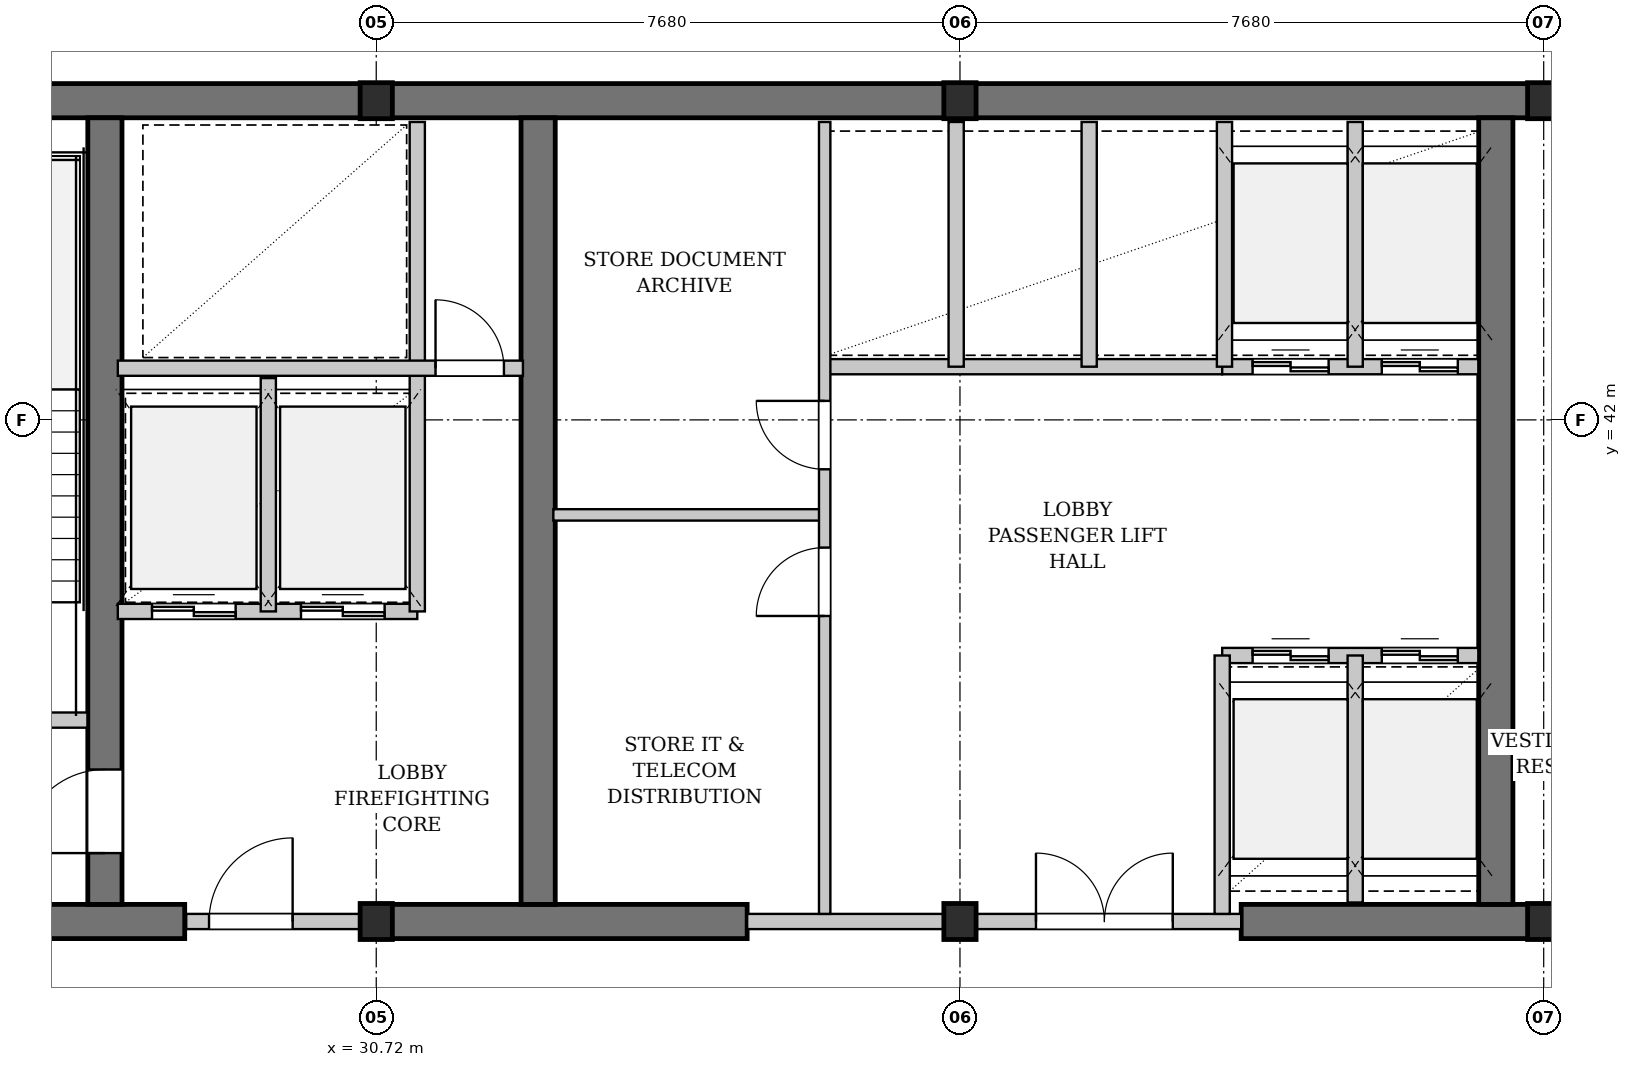
"""IFC4 building model, lengths in metres.
Left out: names, types, materials, properties, quantities, classifications, styles, units other than length and angle.
Written with IfcOpenShell. Run it as: python <this file> out.ifc"""

import sys

from ifc_helpers import new_model, si_unit, direction, frame, frame_2d, origin, origin_2d, place, context, subcontext, project, spatial, rectangle, i_section, extrude, element, fill, save


model = new_model("IFC4")
c1 = context("Model", 3, precision=1e-05, world=origin(), true_north=direction((0.0, 1.0)))
c2 = subcontext(c1, "Body", "Model", "MODEL_VIEW")
j1 = project(units=[si_unit("LENGTHUNIT", "METRE"), si_unit("PLANEANGLEUNIT", "RADIAN")], contexts=[c1])
p1 = place(None, origin())
s1 = spatial("IfcSite", under=j1, at=p1, CompositionType="ELEMENT")
p2 = place(p1, origin())
s2 = spatial("IfcBuilding", under=s1, at=p2, CompositionType="ELEMENT")
p3 = place(p2, frame((0.0, 0.0, 141.2)))
s3 = spatial("IfcBuildingStorey", under=s2, at=p3, CompositionType="ELEMENT", Elevation=141.2)
p4 = place(p3, frame((22.815, 46.2, 0.0), z_axis=(0.0, 0.0, 1.0), x_axis=(1.0, 0.0, 0.0)))
e1 = element("IfcWall", 1, at=p4, inside=s3, PredefinedType="SHEAR", context=c2, shape_type="SweptSolid", body=[
    extrude(rectangle(XDim=31.17, YDim=0.45, at=frame_2d((15.585, 0.0))), origin(), (0.0, 0.0, 1.0), 3.48),
])
p5 = place(p3, frame((22.815, 35.4, 0.0), z_axis=(0.0, 0.0, 1.0), x_axis=(1.0, 0.0, 0.0)))
e2 = element("IfcWall", 2, at=p5, inside=s3, PredefinedType="SHEAR", context=c2, shape_type="SweptSolid", body=[
    extrude(rectangle(XDim=5.385, YDim=0.45, at=frame_2d((2.692, 0.0))), origin(), (0.0, 0.0, 1.0), 3.48),
])
p6 = place(p3, frame((30.72, 35.4, 0.0), z_axis=(0.0, 0.0, 1.0), x_axis=(1.0, 0.0, 0.0)))
e3 = element("IfcWall", 3, at=p6, inside=s3, PredefinedType="SHEAR", context=c2, shape_type="SweptSolid", body=[
    extrude(rectangle(XDim=4.88, YDim=0.45, at=frame_2d((2.44, 0.0))), origin(), (0.0, 0.0, 1.0), 3.48),
])
p7 = place(p3, frame((42.1, 35.4, 0.0), z_axis=(0.0, 0.0, 1.0), x_axis=(1.0, 0.0, 0.0)))
e4 = element("IfcWall", 4, at=p7, inside=s3, PredefinedType="SHEAR", context=c2, shape_type="SweptSolid", body=[
    extrude(rectangle(XDim=8.05, YDim=0.45, at=frame_2d((4.025, 0.0))), origin(), (0.0, 0.0, 1.0), 3.48),
])
p8 = place(p7, frame((4.85, 0.0, 0.0)))
e5 = element("IfcOpeningElement", 5, at=p8, cuts=e4, PredefinedType="OPENING", context=c2, shape_type="SweptSolid", body=[
    extrude(rectangle(XDim=0.9, YDim=2.15, at=frame_2d((0.45, 1.075))), frame((0.0, 0.235, 0.0), z_axis=(0.0, -1.0, 0.0), x_axis=(1.0, 0.0, 0.0)), (0.0, 0.0, 1.0), 0.47),
])
p9 = place(p3, frame((27.15, 35.625, 0.0), z_axis=(0.0, 0.0, 1.0), x_axis=(0.0, 1.0, 0.0)))
e6 = element("IfcWall", 6, at=p9, inside=s3, PredefinedType="SHEAR", context=c2, shape_type="SweptSolid", body=[
    extrude(rectangle(XDim=10.35, YDim=0.45, at=frame_2d((5.175, 0.0))), origin(), (0.0, 0.0, 1.0), 3.48),
])
p10 = place(p9, frame((0.675, 0.0, 0.0)))
e7 = element("IfcOpeningElement", 7, at=p10, cuts=e6, PredefinedType="OPENING", context=c2, shape_type="SweptSolid", body=[
    extrude(rectangle(XDim=1.1, YDim=2.15, at=frame_2d((0.55, 1.075))), frame((0.0, 0.235, 0.0), z_axis=(0.0, -1.0, 0.0), x_axis=(1.0, 0.0, 0.0)), (0.0, 0.0, 1.0), 0.47),
])
for number, where, z_axis, x_axis in (
    (8, (32.85, 35.625, 0.0), (0.0, 0.0, 1.0), (0.0, 1.0, 0.0)),
    (9, (45.45, 35.625, 0.0), (0.0, 0.0, 1.0), (0.0, 1.0, 0.0)),
):
    element("IfcWall", number, at=place(p3, frame(where, z_axis=z_axis, x_axis=x_axis)), inside=s3, PredefinedType="SHEAR", context=c2, shape_type="SweptSolid", body=[
        extrude(rectangle(XDim=10.35, YDim=0.45, at=frame_2d((5.175, 0.0))), origin(), (0.0, 0.0, 1.0), 3.48),
    ])
for number, where, z_axis, x_axis in (
    (10, (30.72, 35.4, 0.0), (0.0, 0.0, 1.0), (1.0, 0.0, 0.0)),
    (11, (30.72, 46.2, 0.0), (0.0, 0.0, 1.0), (1.0, 0.0, 0.0)),
    (12, (38.4, 35.4, 0.0), (0.0, 0.0, 1.0), (1.0, 0.0, 0.0)),
    (13, (38.4, 46.2, 0.0), (0.0, 0.0, 1.0), (1.0, 0.0, 0.0)),
    (14, (46.08, 35.4, 0.0), (0.0, 0.0, 1.0), (1.0, 0.0, 0.0)),
    (15, (46.08, 46.2, 0.0), (0.0, 0.0, 1.0), (1.0, 0.0, 0.0)),
):
    element("IfcColumn", number, at=place(p3, frame(where, z_axis=z_axis, x_axis=x_axis)), inside=s3, PredefinedType="COLUMN", context=c2, shape_type="SweptSolid", body=[
        extrude(i_section(OverallWidth=0.424, OverallDepth=0.474, WebThickness=0.047, FlangeThickness=0.077, FilletRadius=0.015, at=origin_2d()), origin(), (0.0, 0.0, 1.0), 3.9),
    ])
p11 = place(p3, frame((23.3, 38.05, 0.0), z_axis=(0.0, 0.0, 1.0), x_axis=(1.0, 0.0, 0.0)))
e16 = element("IfcWall", 16, at=p11, inside=s3, PredefinedType="PARTITIONING", context=c2, shape_type="SweptSolid", body=[
    extrude(rectangle(XDim=3.62, YDim=0.2, at=frame_2d((1.81, 0.0))), origin(), (0.0, 0.0, 1.0), 3.48),
])
p12 = place(p11, frame((1.26, 0.0, 0.0)))
e17 = element("IfcOpeningElement", 17, at=p12, cuts=e16, PredefinedType="OPENING", context=c2, shape_type="SweptSolid", body=[
    extrude(rectangle(XDim=1.1, YDim=2.15, at=frame_2d((0.55, 1.075))), frame((0.0, 0.11, 0.0), z_axis=(0.0, -1.0, 0.0), x_axis=(1.0, 0.0, 0.0)), (0.0, 0.0, 1.0), 0.22),
])
p13 = place(p3, frame((28.22, 35.4, 0.0), z_axis=(0.0, 0.0, 1.0), x_axis=(1.0, 0.0, 0.0)))
e18 = element("IfcWall", 18, at=p13, inside=s3, PredefinedType="PARTITIONING", context=c2, shape_type="SweptSolid", body=[
    extrude(rectangle(XDim=2.5, YDim=0.2, at=frame_2d((1.25, 0.0))), origin(), (0.0, 0.0, 1.0), 2.565),
])
p14 = place(p13, frame((0.3, 0.0, 0.0)))
e19 = element("IfcOpeningElement", 19, at=p14, cuts=e18, PredefinedType="OPENING", context=c2, shape_type="SweptSolid", body=[
    extrude(rectangle(XDim=1.1, YDim=2.15, at=frame_2d((0.55, 1.075))), frame((0.0, 0.11, 0.0), z_axis=(0.0, -1.0, 0.0), x_axis=(1.0, 0.0, 0.0)), (0.0, 0.0, 1.0), 0.22),
])
p15 = place(p3, frame((27.32, 39.48, 0.0), z_axis=(0.0, 0.0, 1.0), x_axis=(1.0, 0.0, 0.0)))
e20 = element("IfcWall", 20, at=p15, inside=s3, PredefinedType="PARTITIONING", context=c2, shape_type="SweptSolid", body=[
    extrude(rectangle(XDim=3.94, YDim=0.2, at=frame_2d((1.97, 0.0))), origin(), (0.0, 0.0, 1.0), 3.48),
])
p16 = place(p15, frame((0.45, 0.0, 0.0)))
e21 = element("IfcOpeningElement", 21, at=p16, cuts=e20, PredefinedType="OPENING", context=c2, shape_type="SweptSolid", body=[
    extrude(rectangle(XDim=1.1, YDim=2.2, at=frame_2d((0.55, 1.1))), frame((0.0, 0.11, 0.0), z_axis=(0.0, -1.0, 0.0), x_axis=(1.0, 0.0, 0.0)), (0.0, 0.0, 1.0), 0.22),
])
p17 = place(p15, frame((2.41, 0.0, 0.0)))
e22 = element("IfcOpeningElement", 22, at=p17, cuts=e20, PredefinedType="OPENING", context=c2, shape_type="SweptSolid", body=[
    extrude(rectangle(XDim=1.1, YDim=2.2, at=frame_2d((0.55, 1.1))), frame((0.0, 0.11, 0.0), z_axis=(0.0, -1.0, 0.0), x_axis=(1.0, 0.0, 0.0)), (0.0, 0.0, 1.0), 0.22),
])
p18 = place(p3, frame((29.3, 39.48, 0.0), z_axis=(0.0, 0.0, 1.0), x_axis=(0.0, 1.0, 0.0)))
e23 = element("IfcWall", 23, at=p18, inside=s3, PredefinedType="PARTITIONING", context=c2, shape_type="SweptSolid", body=[
    extrude(rectangle(XDim=3.07, YDim=0.2, at=frame_2d((1.535, 0.0))), origin(), (0.0, 0.0, 1.0), 3.48),
])
p19 = place(p3, frame((31.26, 39.48, 0.0), z_axis=(0.0, 0.0, 1.0), x_axis=(0.0, 1.0, 0.0)))
e24 = element("IfcWall", 24, at=p19, inside=s3, PredefinedType="PARTITIONING", context=c2, shape_type="SweptSolid", body=[
    extrude(rectangle(XDim=6.44, YDim=0.2, at=frame_2d((3.22, 0.0))), origin(), (0.0, 0.0, 1.0), 3.48),
])
p20 = place(p3, frame((27.32, 42.68, 0.0), z_axis=(0.0, 0.0, 1.0), x_axis=(1.0, 0.0, 0.0)))
e25 = element("IfcWall", 25, at=p20, inside=s3, PredefinedType="PARTITIONING", context=c2, shape_type="SweptSolid", body=[
    extrude(rectangle(XDim=5.33, YDim=0.2, at=frame_2d((2.665, 0.0))), origin(), (0.0, 0.0, 1.0), 3.48),
])
p21 = place(p20, frame((4.18, 0.0, 0.0)))
e26 = element("IfcOpeningElement", 26, at=p21, cuts=e25, PredefinedType="OPENING", context=c2, shape_type="SweptSolid", body=[
    extrude(rectangle(XDim=0.9, YDim=2.15, at=frame_2d((0.45, 1.075))), frame((0.0, 0.11, 0.0), z_axis=(0.0, -1.0, 0.0), x_axis=(1.0, 0.0, 0.0)), (0.0, 0.0, 1.0), 0.22),
])
p22 = place(p3, frame((35.6, 35.4, 0.0), z_axis=(0.0, 0.0, 1.0), x_axis=(1.0, 0.0, 0.0)))
e27 = element("IfcWall", 27, at=p22, inside=s3, PredefinedType="PARTITIONING", context=c2, shape_type="SweptSolid", body=[
    extrude(rectangle(XDim=6.5, YDim=0.2, at=frame_2d((3.25, 0.0))), origin(), (0.0, 0.0, 1.0), 2.565),
])
p23 = place(p22, frame((3.8, 0.0, 0.0)))
e28 = element("IfcOpeningElement", 28, at=p23, cuts=e27, PredefinedType="OPENING", context=c2, shape_type="SweptSolid", body=[
    extrude(rectangle(XDim=1.8, YDim=2.3, at=frame_2d((0.9, 1.15))), frame((0.0, 0.11, 0.0), z_axis=(0.0, -1.0, 0.0), x_axis=(1.0, 0.0, 0.0)), (0.0, 0.0, 1.0), 0.22),
])
p24 = place(p3, frame((36.6, 42.7, 0.0), z_axis=(0.0, 0.0, 1.0), x_axis=(1.0, 0.0, 0.0)))
e29 = element("IfcWall", 29, at=p24, inside=s3, PredefinedType="PARTITIONING", context=c2, shape_type="SweptSolid", body=[
    extrude(rectangle(XDim=5.25, YDim=0.2, at=frame_2d((2.625, 0.0))), origin(), (0.0, 0.0, 1.0), 3.48),
])
p25 = place(p3, frame((38.35, 42.7, 0.0), z_axis=(0.0, 0.0, 1.0), x_axis=(0.0, 1.0, 0.0)))
e30 = element("IfcWall", 30, at=p25, inside=s3, PredefinedType="PARTITIONING", context=c2, shape_type="SweptSolid", body=[
    extrude(rectangle(XDim=3.22, YDim=0.2, at=frame_2d((1.61, 0.0))), origin(), (0.0, 0.0, 1.0), 2.565),
])
p26 = place(p3, frame((40.1, 42.7, 0.0), z_axis=(0.0, 0.0, 1.0), x_axis=(0.0, 1.0, 0.0)))
e31 = element("IfcWall", 31, at=p26, inside=s3, PredefinedType="PARTITIONING", context=c2, shape_type="SweptSolid", body=[
    extrude(rectangle(XDim=3.22, YDim=0.2, at=frame_2d((1.61, 0.0))), origin(), (0.0, 0.0, 1.0), 3.48),
])
p27 = place(p3, frame((33.05, 40.75, 0.0), z_axis=(0.0, 0.0, 1.0), x_axis=(1.0, 0.0, 0.0)))
e32 = element("IfcWall", 32, at=p27, inside=s3, PredefinedType="PARTITIONING", context=c2, shape_type="SweptSolid", body=[
    extrude(rectangle(XDim=3.57, YDim=0.15, at=frame_2d((1.785, 0.0))), origin(), (0.0, 0.0, 1.0), 3.48),
])
p28 = place(p3, frame((36.62, 35.5, 0.0), z_axis=(0.0, 0.0, 1.0), x_axis=(0.0, 1.0, 0.0)))
e33 = element("IfcWall", 33, at=p28, inside=s3, PredefinedType="PARTITIONING", context=c2, shape_type="SweptSolid", body=[
    extrude(rectangle(XDim=10.42, YDim=0.15, at=frame_2d((5.21, 0.0))), origin(), (0.0, 0.0, 1.0), 3.48),
])
p29 = place(p28, frame((3.92, 0.0, 0.0)))
e34 = element("IfcOpeningElement", 34, at=p29, cuts=e33, PredefinedType="OPENING", context=c2, shape_type="SweptSolid", body=[
    extrude(rectangle(XDim=0.9, YDim=2.15, at=frame_2d((0.45, 1.075))), frame((0.0, 0.085, 0.0), z_axis=(0.0, -1.0, 0.0), x_axis=(1.0, 0.0, 0.0)), (0.0, 0.0, 1.0), 0.17),
])
p30 = place(p28, frame((5.85, 0.0, 0.0)))
e35 = element("IfcOpeningElement", 35, at=p30, cuts=e33, PredefinedType="OPENING", context=c2, shape_type="SweptSolid", body=[
    extrude(rectangle(XDim=0.9, YDim=2.15, at=frame_2d((0.45, 1.075))), frame((0.0, 0.085, 0.0), z_axis=(0.0, -1.0, 0.0), x_axis=(1.0, 0.0, 0.0)), (0.0, 0.0, 1.0), 0.17),
])
p31 = place(p3, frame((41.85, 38.9, 0.0), z_axis=(0.0, 0.0, 1.0), x_axis=(1.0, 0.0, 0.0)))
e36 = element("IfcWall", 36, at=p31, inside=s3, PredefinedType="PARTITIONING", context=c2, shape_type="SweptSolid", body=[
    extrude(rectangle(XDim=3.37, YDim=0.2, at=frame_2d((1.685, 0.0))), origin(), (0.0, 0.0, 1.0), 3.48),
])
p32 = place(p31, frame((0.4, 0.0, 0.0)))
e37 = element("IfcOpeningElement", 37, at=p32, cuts=e36, PredefinedType="OPENING", context=c2, shape_type="SweptSolid", body=[
    extrude(rectangle(XDim=1.0, YDim=2.2, at=frame_2d((0.5, 1.1))), frame((0.0, 0.11, 0.0), z_axis=(0.0, -1.0, 0.0), x_axis=(1.0, 0.0, 0.0)), (0.0, 0.0, 1.0), 0.22),
])
p33 = place(p31, frame((2.1, 0.0, 0.0)))
e38 = element("IfcOpeningElement", 38, at=p33, cuts=e36, PredefinedType="OPENING", context=c2, shape_type="SweptSolid", body=[
    extrude(rectangle(XDim=1.0, YDim=2.2, at=frame_2d((0.5, 1.1))), frame((0.0, 0.11, 0.0), z_axis=(0.0, -1.0, 0.0), x_axis=(1.0, 0.0, 0.0)), (0.0, 0.0, 1.0), 0.22),
])
p34 = place(p3, frame((41.85, 42.7, 0.0), z_axis=(0.0, 0.0, 1.0), x_axis=(1.0, 0.0, 0.0)))
e39 = element("IfcWall", 39, at=p34, inside=s3, PredefinedType="PARTITIONING", context=c2, shape_type="SweptSolid", body=[
    extrude(rectangle(XDim=3.37, YDim=0.2, at=frame_2d((1.685, 0.0))), origin(), (0.0, 0.0, 1.0), 3.48),
])
p35 = place(p34, frame((0.4, 0.0, 0.0)))
e40 = element("IfcOpeningElement", 40, at=p35, cuts=e39, PredefinedType="OPENING", context=c2, shape_type="SweptSolid", body=[
    extrude(rectangle(XDim=1.0, YDim=2.2, at=frame_2d((0.5, 1.1))), frame((0.0, 0.11, 0.0), z_axis=(0.0, -1.0, 0.0), x_axis=(1.0, 0.0, 0.0)), (0.0, 0.0, 1.0), 0.22),
])
p36 = place(p34, frame((2.1, 0.0, 0.0)))
e41 = element("IfcOpeningElement", 41, at=p36, cuts=e39, PredefinedType="OPENING", context=c2, shape_type="SweptSolid", body=[
    extrude(rectangle(XDim=1.0, YDim=2.2, at=frame_2d((0.5, 1.1))), frame((0.0, 0.11, 0.0), z_axis=(0.0, -1.0, 0.0), x_axis=(1.0, 0.0, 0.0)), (0.0, 0.0, 1.0), 0.22),
])
p37 = place(p3, frame((43.6, 35.65, 0.0), z_axis=(0.0, 0.0, 1.0), x_axis=(0.0, 1.0, 0.0)))
e42 = element("IfcWall", 42, at=p37, inside=s3, PredefinedType="PARTITIONING", context=c2, shape_type="SweptSolid", body=[
    extrude(rectangle(XDim=3.25, YDim=0.2, at=frame_2d((1.625, 0.0))), origin(), (0.0, 0.0, 1.0), 3.48),
])
p38 = place(p3, frame((43.6, 42.7, 0.0), z_axis=(0.0, 0.0, 1.0), x_axis=(0.0, 1.0, 0.0)))
e43 = element("IfcWall", 43, at=p38, inside=s3, PredefinedType="PARTITIONING", context=c2, shape_type="SweptSolid", body=[
    extrude(rectangle(XDim=3.22, YDim=0.2, at=frame_2d((1.61, 0.0))), origin(), (0.0, 0.0, 1.0), 3.48),
])
p39 = place(p3, frame((41.85, 35.5, 0.0), z_axis=(0.0, 0.0, 1.0), x_axis=(0.0, 1.0, 0.0)))
e44 = element("IfcWall", 44, at=p39, inside=s3, PredefinedType="PARTITIONING", context=c2, shape_type="SweptSolid", body=[
    extrude(rectangle(XDim=3.4, YDim=0.2, at=frame_2d((1.7, 0.0))), origin(), (0.0, 0.0, 1.0), 3.48),
])
p40 = place(p3, frame((41.88, 42.7, 0.0), z_axis=(0.0, 0.0, 1.0), x_axis=(0.0, 1.0, 0.0)))
e45 = element("IfcWall", 45, at=p40, inside=s3, PredefinedType="PARTITIONING", context=c2, shape_type="SweptSolid", body=[
    extrude(rectangle(XDim=3.22, YDim=0.2, at=frame_2d((1.61, 0.0))), origin(), (0.0, 0.0, 1.0), 3.48),
])
p41 = place(p14, origin())
e46 = element("IfcDoor", 46, at=p41, inside=s3, OperationType="SINGLE_SWING_RIGHT", PredefinedType="DOOR", context=c2, shape_type="SweptSolid", body=[
    extrude(rectangle(XDim=1.1, YDim=2.15, at=frame_2d((0.55, 1.075))), frame((0.0, 0.025, 0.0), z_axis=(0.0, -1.0, 0.0), x_axis=(1.0, 0.0, 0.0)), (0.0, 0.0, 1.0), 0.05),
])
fill(e19, e46)
p42 = place(p16, origin())
e47 = element("IfcDoor", 47, at=p42, inside=s3, OperationType="DOUBLE_DOOR_SLIDING", PredefinedType="DOOR", context=c2, shape_type="SweptSolid", body=[
    extrude(rectangle(XDim=1.1, YDim=2.2, at=frame_2d((0.55, 1.1))), frame((0.0, 0.025, 0.0), z_axis=(0.0, -1.0, 0.0), x_axis=(1.0, 0.0, 0.0)), (0.0, 0.0, 1.0), 0.05),
])
fill(e21, e47)
p43 = place(p17, origin())
e48 = element("IfcDoor", 48, at=p43, inside=s3, OperationType="DOUBLE_DOOR_SLIDING", PredefinedType="DOOR", context=c2, shape_type="SweptSolid", body=[
    extrude(rectangle(XDim=1.1, YDim=2.2, at=frame_2d((0.55, 1.1))), frame((0.0, 0.025, 0.0), z_axis=(0.0, -1.0, 0.0), x_axis=(1.0, 0.0, 0.0)), (0.0, 0.0, 1.0), 0.05),
])
fill(e22, e48)
p44 = place(p21, origin())
e49 = element("IfcDoor", 49, at=p44, inside=s3, OperationType="SINGLE_SWING_LEFT", PredefinedType="DOOR", context=c2, shape_type="SweptSolid", body=[
    extrude(rectangle(XDim=0.9, YDim=2.15, at=frame_2d((0.45, 1.075))), frame((0.0, 0.025, 0.0), z_axis=(0.0, -1.0, 0.0), x_axis=(1.0, 0.0, 0.0)), (0.0, 0.0, 1.0), 0.05),
])
fill(e26, e49)
p45 = place(p23, origin())
e50 = element("IfcDoor", 50, at=p45, inside=s3, OperationType="DOUBLE_DOOR_SINGLE_SWING", PredefinedType="DOOR", context=c2, shape_type="SweptSolid", body=[
    extrude(rectangle(XDim=1.8, YDim=2.3, at=frame_2d((0.9, 1.15))), frame((0.0, 0.025, 0.0), z_axis=(0.0, -1.0, 0.0), x_axis=(1.0, 0.0, 0.0)), (0.0, 0.0, 1.0), 0.05),
])
fill(e28, e50)
p46 = place(p29, origin())
e51 = element("IfcDoor", 51, at=p46, inside=s3, OperationType="SINGLE_SWING_LEFT", PredefinedType="DOOR", context=c2, shape_type="SweptSolid", body=[
    extrude(rectangle(XDim=0.9, YDim=2.15, at=frame_2d((0.45, 1.075))), frame((0.0, 0.025, 0.0), z_axis=(0.0, -1.0, 0.0), x_axis=(1.0, 0.0, 0.0)), (0.0, 0.0, 1.0), 0.05),
])
fill(e34, e51)
p47 = place(p30, origin())
e52 = element("IfcDoor", 52, at=p47, inside=s3, OperationType="SINGLE_SWING_RIGHT", PredefinedType="DOOR", context=c2, shape_type="SweptSolid", body=[
    extrude(rectangle(XDim=0.9, YDim=2.15, at=frame_2d((0.45, 1.075))), frame((0.0, 0.025, 0.0), z_axis=(0.0, -1.0, 0.0), x_axis=(1.0, 0.0, 0.0)), (0.0, 0.0, 1.0), 0.05),
])
fill(e35, e52)
p48 = place(p32, origin())
e53 = element("IfcDoor", 53, at=p48, inside=s3, OperationType="DOUBLE_DOOR_SLIDING", PredefinedType="DOOR", context=c2, shape_type="SweptSolid", body=[
    extrude(rectangle(XDim=1.0, YDim=2.2, at=frame_2d((0.5, 1.1))), frame((0.0, 0.025, 0.0), z_axis=(0.0, -1.0, 0.0), x_axis=(1.0, 0.0, 0.0)), (0.0, 0.0, 1.0), 0.05),
])
fill(e37, e53)
p49 = place(p33, origin())
e54 = element("IfcDoor", 54, at=p49, inside=s3, OperationType="DOUBLE_DOOR_SLIDING", PredefinedType="DOOR", context=c2, shape_type="SweptSolid", body=[
    extrude(rectangle(XDim=1.0, YDim=2.2, at=frame_2d((0.5, 1.1))), frame((0.0, 0.025, 0.0), z_axis=(0.0, -1.0, 0.0), x_axis=(1.0, 0.0, 0.0)), (0.0, 0.0, 1.0), 0.05),
])
fill(e38, e54)
p50 = place(p35, origin())
e55 = element("IfcDoor", 55, at=p50, inside=s3, OperationType="DOUBLE_DOOR_SLIDING", PredefinedType="DOOR", context=c2, shape_type="SweptSolid", body=[
    extrude(rectangle(XDim=1.0, YDim=2.2, at=frame_2d((0.5, 1.1))), frame((0.0, 0.025, 0.0), z_axis=(0.0, -1.0, 0.0), x_axis=(1.0, 0.0, 0.0)), (0.0, 0.0, 1.0), 0.05),
])
fill(e40, e55)
p51 = place(p36, origin())
e56 = element("IfcDoor", 56, at=p51, inside=s3, OperationType="DOUBLE_DOOR_SLIDING", PredefinedType="DOOR", context=c2, shape_type="SweptSolid", body=[
    extrude(rectangle(XDim=1.0, YDim=2.2, at=frame_2d((0.5, 1.1))), frame((0.0, 0.025, 0.0), z_axis=(0.0, -1.0, 0.0), x_axis=(1.0, 0.0, 0.0)), (0.0, 0.0, 1.0), 0.05),
])
fill(e41, e56)
p52 = place(p10, origin())
e57 = element("IfcDoor", 57, at=p52, inside=s3, OperationType="SINGLE_SWING_LEFT", PredefinedType="DOOR", context=c2, shape_type="SweptSolid", body=[
    extrude(rectangle(XDim=1.1, YDim=2.15, at=frame_2d((0.55, 1.075))), frame((0.0, 0.025, 0.0), z_axis=(0.0, -1.0, 0.0), x_axis=(1.0, 0.0, 0.0)), (0.0, 0.0, 1.0), 0.05),
])
fill(e7, e57)
save(model, sys.argv[1])
